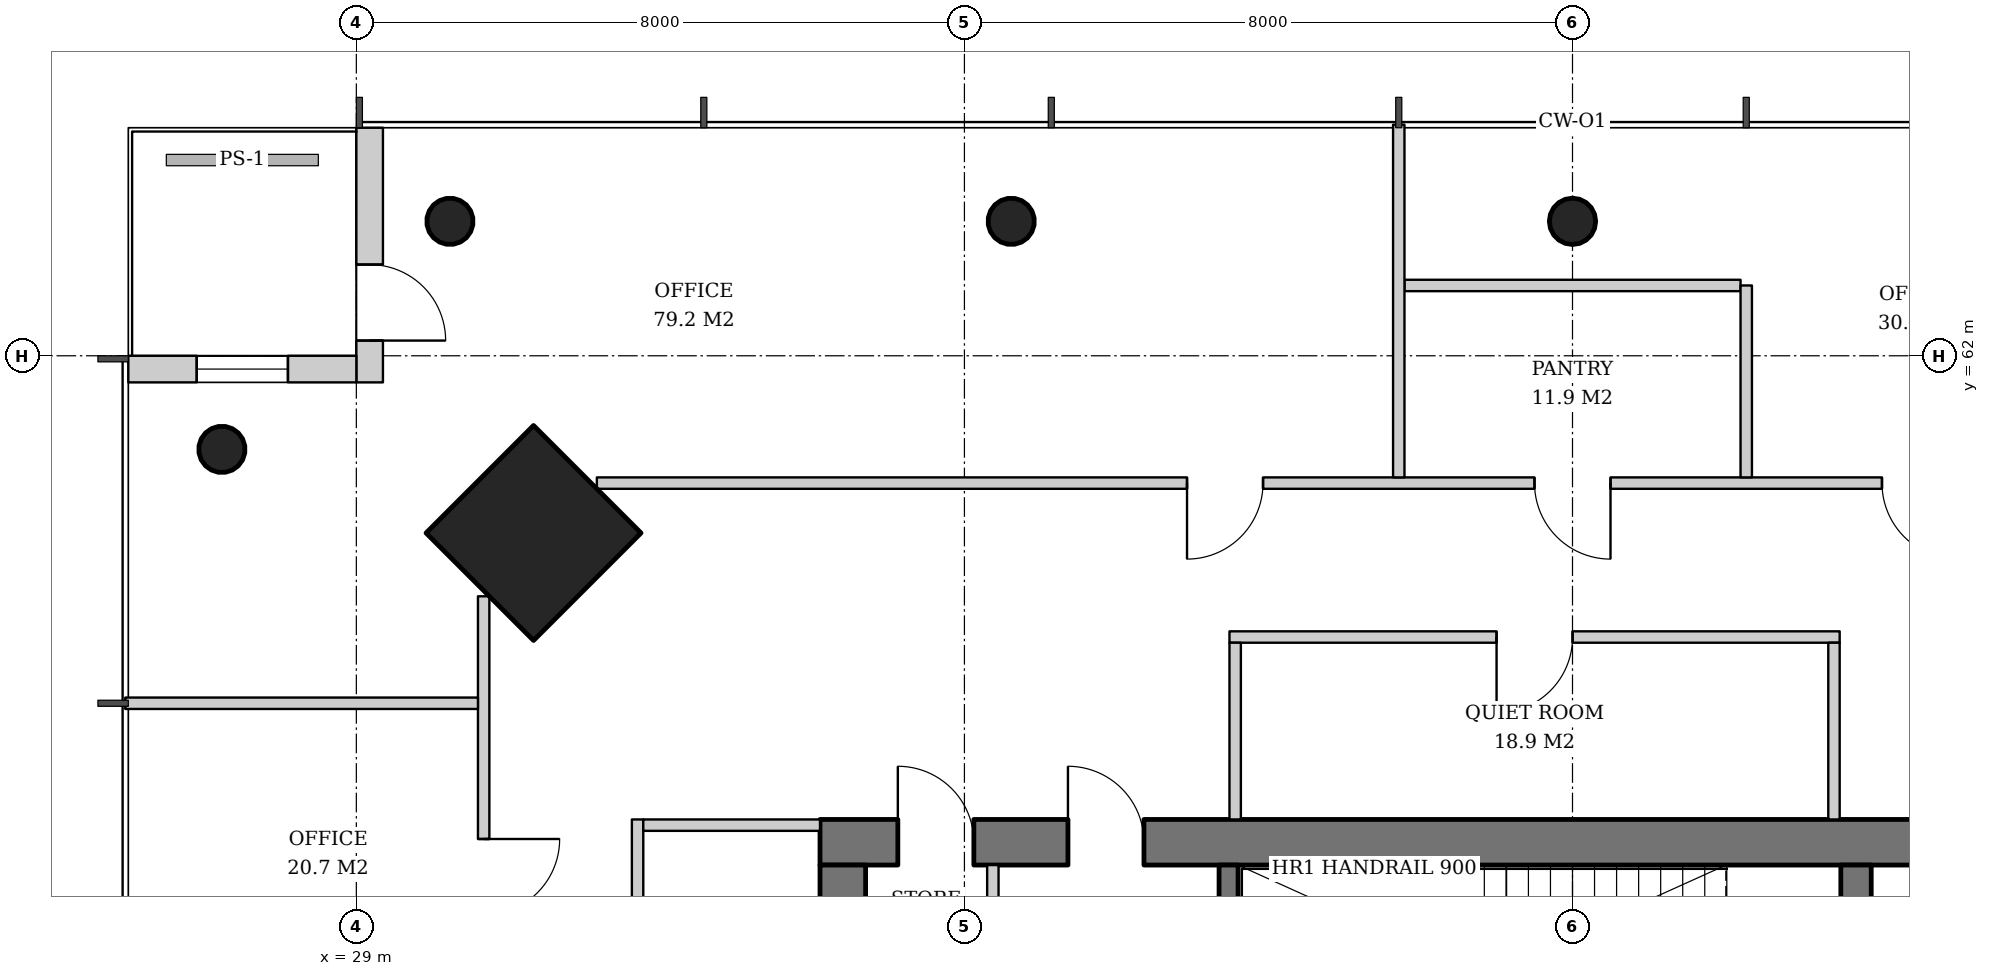
"""IFC4 building model, lengths in metres.
Left out: names, types, materials, properties, quantities, classifications, styles, units other than length and angle.
Written with IfcOpenShell. Run it as: python <this file> out.ifc"""

import sys

from ifc_helpers import new_model, si_unit, direction, frame, frame_2d, origin, origin_2d, place, context, subcontext, project, spatial, rectangle, hollow_circle, extrude, element, fill, save


model = new_model("IFC4")
c1 = context("Model", 3, precision=1e-05, world=origin(), true_north=direction((0.0, 1.0)))
c2 = subcontext(c1, "Body", "Model", "MODEL_VIEW")
j1 = project(units=[si_unit("LENGTHUNIT", "METRE"), si_unit("PLANEANGLEUNIT", "RADIAN")], contexts=[c1])
p1 = place(None, origin())
s1 = spatial("IfcSite", under=j1, at=p1, CompositionType="ELEMENT")
p2 = place(p1, origin())
s2 = spatial("IfcBuilding", under=s1, at=p2, CompositionType="ELEMENT")
p3 = place(p2, frame((0.0, 0.0, 214.8)))
s3 = spatial("IfcBuildingStorey", under=s2, at=p3, CompositionType="ELEMENT", Elevation=214.8)
p4 = place(p3, frame((31.293, 59.707, 0.0), z_axis=(0.031898107953, -0.031898107953, 0.998981992539), x_axis=(0.707106781187, 0.707106781187, 0.0)))
e1 = element("IfcColumn", 1, at=p4, inside=s3, PredefinedType="COLUMN", context=c2, shape_type="SweptSolid", body=[
    extrude(rectangle(XDim=2.0, YDim=2.0, at=origin_2d()), origin(), (0.0, 0.0, 1.0), 3.804),
])
p5 = place(p3, frame((30.193, 63.807, 0.0), z_axis=(0.031898107953, -0.031898107953, 0.998981992539), x_axis=(0.707106781187, 0.707106781187, 0.0)))
e2 = element("IfcColumn", 2, at=p5, inside=s3, PredefinedType="COLUMN", context=c2, shape_type="SweptSolid", body=[
    extrude(hollow_circle(Radius=0.305, WallThickness=0.025, at=origin_2d()), origin(), (0.0, 0.0, 1.0), 3.804),
])
p6 = place(p3, frame((45.0, 63.807, 0.0), z_axis=(0.0, -0.031914348339, 0.999490607445), x_axis=(1.0, 0.0, 0.0)))
e3 = element("IfcColumn", 3, at=p6, inside=s3, PredefinedType="COLUMN", context=c2, shape_type="SweptSolid", body=[
    extrude(hollow_circle(Radius=0.305, WallThickness=0.025, at=origin_2d()), origin(), (0.0, 0.0, 1.0), 3.802),
])
p7 = place(p3, frame((37.596, 63.807, 0.0), z_axis=(0.015987237665, -0.031910269556, 0.999362868496), x_axis=(0.894067115991, 0.447933021895, 0.0)))
e4 = element("IfcColumn", 4, at=p7, inside=s3, PredefinedType="COLUMN", context=c2, shape_type="SweptSolid", body=[
    extrude(hollow_circle(Radius=0.305, WallThickness=0.025, at=origin_2d()), origin(), (0.0, 0.0, 1.0), 3.802),
])
p8 = place(p3, frame((27.193, 60.807, 0.0), z_axis=(0.031898107953, -0.031898107953, 0.998981992539), x_axis=(0.707106781187, 0.707106781187, 0.0)))
e5 = element("IfcColumn", 5, at=p8, inside=s3, PredefinedType="COLUMN", context=c2, shape_type="SweptSolid", body=[
    extrude(hollow_circle(Radius=0.305, WallThickness=0.025, at=origin_2d()), origin(), (0.0, 0.0, 1.0), 3.804),
])
p9 = place(p3, frame((35.1, 55.6, 0.0), z_axis=(0.0, 0.0, 1.0), x_axis=(1.0, 0.0, 0.0)))
e6 = element("IfcWall", 6, at=p9, inside=s3, PredefinedType="SHEAR", context=c2, shape_type="SweptSolid", body=[
    extrude(rectangle(XDim=19.8, YDim=0.6, at=frame_2d((9.9, 0.0))), origin(), (0.0, 0.0, 1.0), 3.8),
])
p10 = place(p9, frame((14.54, 0.0, 0.0)))
e7 = element("IfcOpeningElement", 7, at=p10, cuts=e6, PredefinedType="OPENING", context=c2, shape_type="SweptSolid", body=[
    extrude(rectangle(XDim=1.0, YDim=2.1, at=frame_2d((0.5, 1.05))), frame((0.0, 0.31, 0.0), z_axis=(0.0, -1.0, 0.0), x_axis=(1.0, 0.0, 0.0)), (0.0, 0.0, 1.0), 0.62),
])
p11 = place(p9, frame((1.024, 0.0, 0.0)))
e8 = element("IfcOpeningElement", 8, at=p11, cuts=e6, PredefinedType="OPENING", context=c2, shape_type="SweptSolid", body=[
    extrude(rectangle(XDim=1.0, YDim=2.1, at=frame_2d((0.5, 1.05))), frame((0.0, 0.31, 0.0), z_axis=(0.0, -1.0, 0.0), x_axis=(1.0, 0.0, 0.0)), (0.0, 0.0, 1.0), 0.62),
])
p12 = place(p9, frame((3.262, 0.0, 0.0)))
e9 = element("IfcOpeningElement", 9, at=p12, cuts=e6, PredefinedType="OPENING", context=c2, shape_type="SweptSolid", body=[
    extrude(rectangle(XDim=1.0, YDim=2.1, at=frame_2d((0.5, 1.05))), frame((0.0, 0.31, 0.0), z_axis=(0.0, -1.0, 0.0), x_axis=(1.0, 0.0, 0.0)), (0.0, 0.0, 1.0), 0.62),
])
p13 = place(p3, frame((35.4, 36.7, 0.0), z_axis=(0.0, 0.0, 1.0), x_axis=(0.0, 1.0, 0.0)))
e10 = element("IfcWall", 10, at=p13, inside=s3, PredefinedType="SHEAR", context=c2, shape_type="SweptSolid", body=[
    extrude(rectangle(XDim=18.6, YDim=0.6, at=frame_2d((9.3, 0.0))), origin(), (0.0, 0.0, 1.0), 3.8),
])
p14 = place(p13, frame((8.4, 0.0, 0.0)))
e11 = element("IfcOpeningElement", 11, at=p14, cuts=e10, PredefinedType="OPENING", context=c2, shape_type="SweptSolid", body=[
    extrude(rectangle(XDim=1.8, YDim=2.4, at=frame_2d((0.9, 1.2))), frame((0.0, 0.31, 0.0), z_axis=(0.0, -1.0, 0.0), x_axis=(1.0, 0.0, 0.0)), (0.0, 0.0, 1.0), 0.62),
])
p15 = place(p3, frame((48.73, 52.4, 0.0), z_axis=(0.0, 0.0, 1.0), x_axis=(0.0, 1.0, 0.0)))
e12 = element("IfcWall", 12, at=p15, inside=s3, PredefinedType="SHEAR", context=c2, shape_type="SweptSolid", body=[
    extrude(rectangle(XDim=2.9, YDim=0.4, at=frame_2d((1.45, 0.0))), origin(), (0.0, 0.0, 1.0), 3.8),
])
p16 = place(p15, frame((0.3, 0.0, 0.0)))
e13 = element("IfcOpeningElement", 13, at=p16, cuts=e12, PredefinedType="OPENING", context=c2, shape_type="SweptSolid", body=[
    extrude(rectangle(XDim=1.0, YDim=2.1, at=frame_2d((0.5, 1.05))), frame((0.0, 0.21, 0.0), z_axis=(0.0, -1.0, 0.0), x_axis=(1.0, 0.0, 0.0)), (0.0, 0.0, 1.0), 0.42),
])
p17 = place(p3, frame((29.175, 65.0, 0.0), z_axis=(0.0, 0.0, 1.0), x_axis=(0.0, -1.0, 0.0)))
e14 = element("IfcWall", 14, at=p17, inside=s3, PredefinedType="SOLIDWALL", context=c2, shape_type="SweptSolid", body=[
    extrude(rectangle(XDim=3.35, YDim=0.35, at=frame_2d((1.675, 0.0))), origin(), (0.0, 0.0, 1.0), 3.62),
])
p18 = place(p17, frame((1.8, 0.0, 0.0)))
e15 = element("IfcOpeningElement", 15, at=p18, cuts=e14, PredefinedType="OPENING", context=c2, shape_type="SweptSolid", body=[
    extrude(rectangle(XDim=1.0, YDim=2.4, at=frame_2d((0.5, 1.2))), frame((0.0, 0.185, 0.0), z_axis=(0.0, -1.0, 0.0), x_axis=(1.0, 0.0, 0.0)), (0.0, 0.0, 1.0), 0.37),
])
p19 = place(p3, frame((29.0, 61.825, 0.0), z_axis=(0.0, 0.0, 1.0), x_axis=(-1.0, 0.0, 0.0)))
e16 = element("IfcWall", 16, at=p19, inside=s3, PredefinedType="SOLIDWALL", context=c2, shape_type="SweptSolid", body=[
    extrude(rectangle(XDim=3.0, YDim=0.35, at=frame_2d((1.5, 0.0))), origin(), (0.0, 0.0, 1.0), 3.62),
])
p20 = place(p19, frame((0.9, 0.0, 0.6)))
e17 = element("IfcOpeningElement", 17, at=p20, cuts=e16, PredefinedType="OPENING", context=c2, shape_type="SweptSolid", body=[
    extrude(rectangle(XDim=1.2, YDim=2.55, at=frame_2d((0.6, 1.275))), frame((0.0, 0.185, 0.0), z_axis=(0.0, -1.0, 0.0), x_axis=(1.0, 0.0, 0.0)), (0.0, 0.0, 1.0), 0.37),
])
p21 = place(p3, frame((40.475, 52.4, 0.0), z_axis=(0.0, 0.0, 1.0), x_axis=(0.0, 1.0, 0.0)))
e18 = element("IfcWall", 18, at=p21, inside=s3, PredefinedType="SHEAR", context=c2, shape_type="SweptSolid", body=[
    extrude(rectangle(XDim=2.9, YDim=0.25, at=frame_2d((1.45, 0.0))), origin(), (0.0, 0.0, 1.0), 3.8),
])
p22 = place(p3, frame((37.374, 52.4, 0.0), z_axis=(0.0, 0.0, 1.0), x_axis=(0.0, 1.0, 0.0)))
e19 = element("IfcWall", 19, at=p22, inside=s3, PredefinedType="SOLIDWALL", context=c2, shape_type="SweptSolid", body=[
    extrude(rectangle(XDim=2.9, YDim=0.15, at=frame_2d((1.45, 0.0))), origin(), (0.0, 0.0, 1.0), 3.62),
])
p23 = place(p3, frame((48.515, 58.3, 0.0), z_axis=(0.0, 0.0, 1.0), x_axis=(-1.0, 0.0, 0.0)))
e20 = element("IfcWall", 20, at=p23, inside=s3, PredefinedType="PARTITIONING", context=c2, shape_type="SweptSolid", body=[
    extrude(rectangle(XDim=8.028, YDim=0.15, at=frame_2d((4.014, 0.0))), origin(), (0.0, 0.0, 1.0), 2.867),
])
p24 = place(p23, frame((3.514, 0.0, 0.0)))
e21 = element("IfcOpeningElement", 21, at=p24, cuts=e20, PredefinedType="OPENING", context=c2, shape_type="SweptSolid", body=[
    extrude(rectangle(XDim=1.0, YDim=2.1, at=frame_2d((0.5, 1.05))), frame((0.0, 0.085, 0.0), z_axis=(0.0, -1.0, 0.0), x_axis=(1.0, 0.0, 0.0)), (0.0, 0.0, 1.0), 0.17),
])
for number, where, z_axis, x_axis in (
    (22, (48.44, 55.9, 0.0), (0.0, 0.0, 1.0), (0.0, 1.0, 0.0)),
    (23, (40.562, 55.9, 0.0), (0.0, 0.0, 1.0), (0.0, 1.0, 0.0)),
):
    element("IfcWall", number, at=place(p3, frame(where, z_axis=z_axis, x_axis=x_axis)), inside=s3, PredefinedType="PARTITIONING", context=c2, shape_type="SweptSolid", body=[
        extrude(rectangle(XDim=2.325, YDim=0.15, at=frame_2d((1.163, 0.0))), origin(), (0.0, 0.0, 1.0), 3.62),
    ])
p25 = place(p3, frame((32.7, 55.9, 0.0), z_axis=(0.0, 0.0, 1.0), x_axis=(0.0, -1.0, 0.0)))
e24 = element("IfcWall", 24, at=p25, inside=s3, PredefinedType="PARTITIONING", context=c2, shape_type="SweptSolid", body=[
    extrude(rectangle(XDim=7.875, YDim=0.15, at=frame_2d((3.938, 0.0))), origin(), (0.0, 0.0, 1.0), 2.867),
])
p26 = place(p25, frame((3.438, 0.0, 0.0)))
e25 = element("IfcOpeningElement", 25, at=p26, cuts=e24, PredefinedType="OPENING", context=c2, shape_type="SweptSolid", body=[
    extrude(rectangle(XDim=1.0, YDim=2.1, at=frame_2d((0.5, 1.05))), frame((0.0, 0.085, 0.0), z_axis=(0.0, -1.0, 0.0), x_axis=(1.0, 0.0, 0.0)), (0.0, 0.0, 1.0), 0.17),
])
p27 = place(p3, frame((35.1, 55.825, 0.0), z_axis=(0.0, 0.0, 1.0), x_axis=(-1.0, 0.0, 0.0)))
e26 = element("IfcWall", 26, at=p27, inside=s3, PredefinedType="PARTITIONING", context=c2, shape_type="SweptSolid", body=[
    extrude(rectangle(XDim=2.325, YDim=0.15, at=frame_2d((1.163, 0.0))), origin(), (0.0, 0.0, 1.0), 2.92),
])
p28 = place(p3, frame((47.211, 62.925, 0.0), z_axis=(0.0, 0.0, 1.0), x_axis=(-1.0, 0.0, 0.0)))
e27 = element("IfcWall", 27, at=p28, inside=s3, PredefinedType="PARTITIONING", context=c2, shape_type="SweptSolid", body=[
    extrude(rectangle(XDim=4.421, YDim=0.15, at=frame_2d((2.211, 0.0))), origin(), (0.0, 0.0, 1.0), 2.867),
])
p29 = place(p3, frame((57.836, 60.325, 0.0), z_axis=(0.0, 0.0, 1.0), x_axis=(-1.0, 0.0, 0.0)))
e28 = element("IfcWall", 28, at=p29, inside=s3, PredefinedType="PARTITIONING", context=c2, shape_type="SweptSolid", body=[
    extrude(rectangle(XDim=25.671, YDim=0.15, at=frame_2d((12.836, 0.0))), origin(), (0.0, 0.0, 1.0), 2.867),
])
p30 = place(p29, frame((3.193, 0.0, 0.0)))
e29 = element("IfcOpeningElement", 29, at=p30, cuts=e28, PredefinedType="OPENING", context=c2, shape_type="SweptSolid", body=[
    extrude(rectangle(XDim=1.0, YDim=2.1, at=frame_2d((0.5, 1.05))), frame((0.0, 0.085, 0.0), z_axis=(0.0, -1.0, 0.0), x_axis=(1.0, 0.0, 0.0)), (0.0, 0.0, 1.0), 0.17),
])
p31 = place(p29, frame((7.764, 0.0, 0.0)))
e30 = element("IfcOpeningElement", 30, at=p31, cuts=e28, PredefinedType="OPENING", context=c2, shape_type="SweptSolid", body=[
    extrude(rectangle(XDim=1.0, YDim=2.1, at=frame_2d((0.5, 1.05))), frame((0.0, 0.085, 0.0), z_axis=(0.0, -1.0, 0.0), x_axis=(1.0, 0.0, 0.0)), (0.0, 0.0, 1.0), 0.17),
])
p32 = place(p29, frame((12.336, 0.0, 0.0)))
e31 = element("IfcOpeningElement", 31, at=p32, cuts=e28, PredefinedType="OPENING", context=c2, shape_type="SweptSolid", body=[
    extrude(rectangle(XDim=1.0, YDim=2.1, at=frame_2d((0.5, 1.05))), frame((0.0, 0.085, 0.0), z_axis=(0.0, -1.0, 0.0), x_axis=(1.0, 0.0, 0.0)), (0.0, 0.0, 1.0), 0.17),
])
p33 = place(p29, frame((16.907, 0.0, 0.0)))
e32 = element("IfcOpeningElement", 32, at=p33, cuts=e28, PredefinedType="OPENING", context=c2, shape_type="SweptSolid", body=[
    extrude(rectangle(XDim=1.0, YDim=2.1, at=frame_2d((0.5, 1.05))), frame((0.0, 0.085, 0.0), z_axis=(0.0, -1.0, 0.0), x_axis=(1.0, 0.0, 0.0)), (0.0, 0.0, 1.0), 0.17),
])
p34 = place(p3, frame((47.286, 60.4, 0.0), z_axis=(0.0, 0.0, 1.0), x_axis=(0.0, 1.0, 0.0)))
e33 = element("IfcWall", 33, at=p34, inside=s3, PredefinedType="PARTITIONING", context=c2, shape_type="SweptSolid", body=[
    extrude(rectangle(XDim=2.525, YDim=0.15, at=frame_2d((1.263, 0.0))), origin(), (0.0, 0.0, 1.0), 3.62),
])
p35 = place(p3, frame((42.714, 60.4, 0.0), z_axis=(0.0, 0.0, 1.0), x_axis=(0.0, 1.0, 0.0)))
e34 = element("IfcWall", 34, at=p35, inside=s3, PredefinedType="PARTITIONING", context=c2, shape_type="SweptSolid", body=[
    extrude(rectangle(XDim=4.64, YDim=0.15, at=frame_2d((2.32, 0.0))), origin(), (0.0, 0.0, 1.0), 3.12),
])
p36 = place(p3, frame((30.675, 58.836, 0.0), z_axis=(0.0, 0.0, 1.0), x_axis=(0.0, -1.0, 0.0)))
e35 = element("IfcWall", 35, at=p36, inside=s3, PredefinedType="PARTITIONING", context=c2, shape_type="SweptSolid", body=[
    extrude(rectangle(XDim=25.671, YDim=0.15, at=frame_2d((12.836, 0.0))), origin(), (0.0, 0.0, 1.0), 2.867),
])
p37 = place(p36, frame((3.193, 0.0, 0.0)))
e36 = element("IfcOpeningElement", 36, at=p37, cuts=e35, PredefinedType="OPENING", context=c2, shape_type="SweptSolid", body=[
    extrude(rectangle(XDim=1.0, YDim=2.1, at=frame_2d((0.5, 1.05))), frame((0.0, 0.085, 0.0), z_axis=(0.0, -1.0, 0.0), x_axis=(1.0, 0.0, 0.0)), (0.0, 0.0, 1.0), 0.17),
])
p38 = place(p36, frame((7.364, 0.0, 0.0)))
e37 = element("IfcOpeningElement", 37, at=p38, cuts=e35, PredefinedType="OPENING", context=c2, shape_type="SweptSolid", body=[
    extrude(rectangle(XDim=1.8, YDim=2.4, at=frame_2d((0.9, 1.2))), frame((0.0, 0.085, 0.0), z_axis=(0.0, -1.0, 0.0), x_axis=(1.0, 0.0, 0.0)), (0.0, 0.0, 1.0), 0.17),
])
p39 = place(p36, frame((12.436, 0.0, 0.0)))
e38 = element("IfcOpeningElement", 38, at=p39, cuts=e35, PredefinedType="OPENING", context=c2, shape_type="SweptSolid", body=[
    extrude(rectangle(XDim=0.8, YDim=2.1, at=frame_2d((0.4, 1.05))), frame((0.0, 0.085, 0.0), z_axis=(0.0, -1.0, 0.0), x_axis=(1.0, 0.0, 0.0)), (0.0, 0.0, 1.0), 0.17),
])
p40 = place(p36, frame((16.907, 0.0, 0.0)))
e39 = element("IfcOpeningElement", 39, at=p40, cuts=e35, PredefinedType="OPENING", context=c2, shape_type="SweptSolid", body=[
    extrude(rectangle(XDim=1.0, YDim=2.1, at=frame_2d((0.5, 1.05))), frame((0.0, 0.085, 0.0), z_axis=(0.0, -1.0, 0.0), x_axis=(1.0, 0.0, 0.0)), (0.0, 0.0, 1.0), 0.17),
])
p41 = place(p36, frame((21.579, 0.0, 0.0)))
e40 = element("IfcOpeningElement", 40, at=p41, cuts=e35, PredefinedType="OPENING", context=c2, shape_type="SweptSolid", body=[
    extrude(rectangle(XDim=0.8, YDim=2.1, at=frame_2d((0.4, 1.05))), frame((0.0, 0.085, 0.0), z_axis=(0.0, -1.0, 0.0), x_axis=(1.0, 0.0, 0.0)), (0.0, 0.0, 1.0), 0.17),
])
p42 = place(p3, frame((30.6, 57.428, 0.0), z_axis=(0.0, 0.0, 1.0), x_axis=(-1.0, 0.0, 0.0)))
e41 = element("IfcWall", 41, at=p42, inside=s3, PredefinedType="PARTITIONING", context=c2, shape_type="SweptSolid", body=[
    extrude(rectangle(XDim=4.64, YDim=0.15, at=frame_2d((2.32, 0.0))), origin(), (0.0, 0.0, 1.0), 3.12),
])
p43 = place(p18, origin())
e42 = element("IfcDoor", 42, at=p43, inside=s3, OperationType="SINGLE_SWING_RIGHT", PredefinedType="DOOR", context=c2, shape_type="SweptSolid", body=[
    extrude(rectangle(XDim=1.0, YDim=2.4, at=frame_2d((0.5, 1.2))), frame((0.0, 0.025, 0.0), z_axis=(0.0, -1.0, 0.0), x_axis=(1.0, 0.0, 0.0)), (0.0, 0.0, 1.0), 0.05),
])
fill(e15, e42)
p44 = place(p20, origin())
e43 = element("IfcWindow", 43, at=p44, inside=s3, PartitioningType="SINGLE_PANEL", PredefinedType="WINDOW", context=c2, shape_type="SweptSolid", body=[
    extrude(rectangle(XDim=1.2, YDim=2.55, at=frame_2d((0.6, 1.275))), frame((0.0, 0.03, 0.0), z_axis=(0.0, -1.0, 0.0), x_axis=(1.0, 0.0, 0.0)), (0.0, 0.0, 1.0), 0.06),
])
fill(e17, e43)
p45 = place(p11, origin())
e44 = element("IfcDoor", 44, at=p45, inside=s3, OperationType="SINGLE_SWING_LEFT", PredefinedType="DOOR", context=c2, shape_type="SweptSolid", body=[
    extrude(rectangle(XDim=1.0, YDim=2.1, at=frame_2d((0.5, 1.05))), frame((0.0, -0.24, 0.0), z_axis=(0.0, -1.0, 0.0), x_axis=(1.0, 0.0, 0.0)), (0.0, 0.0, 1.0), 0.05),
])
fill(e8, e44)
p46 = place(p12, origin())
e45 = element("IfcDoor", 45, at=p46, inside=s3, OperationType="SINGLE_SWING_LEFT", PredefinedType="DOOR", context=c2, shape_type="SweptSolid", body=[
    extrude(rectangle(XDim=1.0, YDim=2.1, at=frame_2d((0.5, 1.05))), frame((0.0, -0.24, 0.0), z_axis=(0.0, -1.0, 0.0), x_axis=(1.0, 0.0, 0.0)), (0.0, 0.0, 1.0), 0.05),
])
fill(e9, e45)
p47 = place(p24, origin())
e46 = element("IfcDoor", 46, at=p47, inside=s3, OperationType="SINGLE_SWING_RIGHT", PredefinedType="DOOR", context=c2, shape_type="SweptSolid", body=[
    extrude(rectangle(XDim=1.0, YDim=2.1, at=frame_2d((0.5, 1.05))), frame((0.0, 0.025, 0.0), z_axis=(0.0, -1.0, 0.0), x_axis=(1.0, 0.0, 0.0)), (0.0, 0.0, 1.0), 0.05),
])
fill(e21, e46)
p48 = place(p31, origin())
e47 = element("IfcDoor", 47, at=p48, inside=s3, OperationType="SINGLE_SWING_LEFT", PredefinedType="DOOR", context=c2, shape_type="SweptSolid", body=[
    extrude(rectangle(XDim=1.0, YDim=2.1, at=frame_2d((0.5, 1.05))), frame((0.0, 0.025, 0.0), z_axis=(0.0, -1.0, 0.0), x_axis=(1.0, 0.0, 0.0)), (0.0, 0.0, 1.0), 0.05),
])
fill(e30, e47)
p49 = place(p32, origin())
e48 = element("IfcDoor", 48, at=p49, inside=s3, OperationType="SINGLE_SWING_LEFT", PredefinedType="DOOR", context=c2, shape_type="SweptSolid", body=[
    extrude(rectangle(XDim=1.0, YDim=2.1, at=frame_2d((0.5, 1.05))), frame((0.0, 0.025, 0.0), z_axis=(0.0, -1.0, 0.0), x_axis=(1.0, 0.0, 0.0)), (0.0, 0.0, 1.0), 0.05),
])
fill(e31, e48)
p50 = place(p33, origin())
e49 = element("IfcDoor", 49, at=p50, inside=s3, OperationType="SINGLE_SWING_RIGHT", PredefinedType="DOOR", context=c2, shape_type="SweptSolid", body=[
    extrude(rectangle(XDim=1.0, YDim=2.1, at=frame_2d((0.5, 1.05))), frame((0.0, 0.025, 0.0), z_axis=(0.0, -1.0, 0.0), x_axis=(1.0, 0.0, 0.0)), (0.0, 0.0, 1.0), 0.05),
])
fill(e32, e49)
p51 = place(p37, origin())
e50 = element("IfcDoor", 50, at=p51, inside=s3, OperationType="SINGLE_SWING_LEFT", PredefinedType="DOOR", context=c2, shape_type="SweptSolid", body=[
    extrude(rectangle(XDim=1.0, YDim=2.1, at=frame_2d((0.5, 1.05))), frame((0.0, 0.025, 0.0), z_axis=(0.0, -1.0, 0.0), x_axis=(1.0, 0.0, 0.0)), (0.0, 0.0, 1.0), 0.05),
])
fill(e36, e50)
save(model, sys.argv[1])
